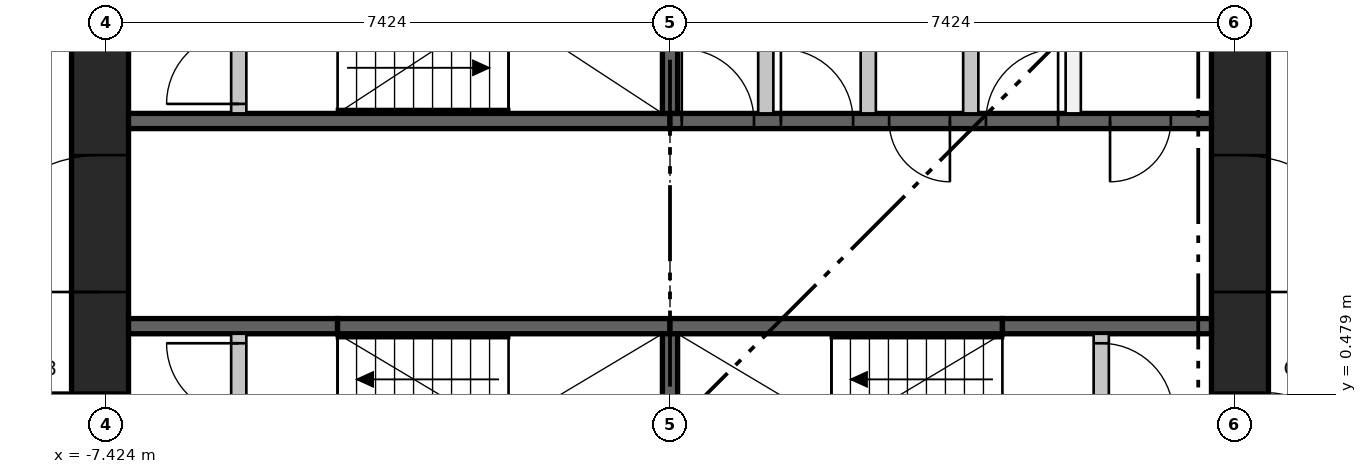
"""IFC4 building model, lengths in metres.
Left out: names, types, materials, properties, quantities, classifications, styles, units other than length and angle.
Written with IfcOpenShell. Run it as: python <this file> out.ifc"""

import sys

from ifc_helpers import new_model, si_unit, direction, frame, frame_2d, origin, place, context, subcontext, project, spatial, rectangle, extrude, element, fill, save


model = new_model("IFC4")
c1 = context("Model", 3, precision=1e-05, world=origin(), true_north=direction((0.0, 1.0)))
c2 = subcontext(c1, "Body", "Model", "MODEL_VIEW")
j1 = project(units=[si_unit("LENGTHUNIT", "METRE"), si_unit("PLANEANGLEUNIT", "RADIAN")], contexts=[c1])
p1 = place(None, origin())
s1 = spatial("IfcSite", under=j1, at=p1, CompositionType="ELEMENT")
p2 = place(p1, origin())
s2 = spatial("IfcBuilding", under=s1, at=p2, CompositionType="ELEMENT")
p3 = place(p2, frame((0.0, 0.0, 109.25)))
s3 = spatial("IfcBuildingStorey", under=s2, at=p3, CompositionType="ELEMENT", Elevation=109.25)
p4 = place(p3, frame((-7.499, -7.124, 0.0), z_axis=(0.0, 0.0, 1.0), x_axis=(0.0, 1.0, 0.0)))
e1 = element("IfcWall", 1, at=p4, inside=s3, PredefinedType="SHEAR", context=c2, shape_type="SweptSolid", body=[
    extrude(rectangle(XDim=14.248, YDim=0.75, at=frame_2d((7.124, 0.0))), origin(), (0.0, 0.0, 1.0), 3.65),
])
p5 = place(p4, frame((6.624, 0.0, 0.0)))
e2 = element("IfcOpeningElement", 2, at=p5, cuts=e1, PredefinedType="OPENING", context=c2, shape_type="SweptSolid", body=[
    extrude(rectangle(XDim=1.0, YDim=2.1, at=frame_2d((0.5, 1.05))), frame((0.0, 0.385, 0.0), z_axis=(0.0, -1.0, 0.0), x_axis=(1.0, 0.0, 0.0)), (0.0, 0.0, 1.0), 0.77),
])
p6 = place(p4, frame((3.5, 0.0, 0.0)))
e3 = element("IfcOpeningElement", 3, at=p6, cuts=e1, PredefinedType="OPENING", context=c2, shape_type="SweptSolid", body=[
    extrude(rectangle(XDim=1.8, YDim=2.1, at=frame_2d((0.9, 1.05))), frame((0.0, 0.385, 0.0), z_axis=(0.0, -1.0, 0.0), x_axis=(1.0, 0.0, 0.0)), (0.0, 0.0, 1.0), 0.77),
])
p7 = place(p4, frame((8.948, 0.0, 0.0)))
e4 = element("IfcOpeningElement", 4, at=p7, cuts=e1, PredefinedType="OPENING", context=c2, shape_type="SweptSolid", body=[
    extrude(rectangle(XDim=1.8, YDim=2.1, at=frame_2d((0.9, 1.05))), frame((0.0, 0.385, 0.0), z_axis=(0.0, -1.0, 0.0), x_axis=(1.0, 0.0, 0.0)), (0.0, 0.0, 1.0), 0.77),
])
p8 = place(p4, frame((12.124, 0.0, 0.0)))
e5 = element("IfcOpeningElement", 5, at=p8, cuts=e1, PredefinedType="OPENING", context=c2, shape_type="SweptSolid", body=[
    extrude(rectangle(XDim=1.0, YDim=2.1, at=frame_2d((0.5, 1.05))), frame((0.0, 0.385, 0.0), z_axis=(0.0, -1.0, 0.0), x_axis=(1.0, 0.0, 0.0)), (0.0, 0.0, 1.0), 0.77),
])
p9 = place(p3, frame((7.499, -7.124, 0.0), z_axis=(0.0, 0.0, 1.0), x_axis=(0.0, 1.0, 0.0)))
e6 = element("IfcWall", 6, at=p9, inside=s3, PredefinedType="SHEAR", context=c2, shape_type="SweptSolid", body=[
    extrude(rectangle(XDim=14.248, YDim=0.75, at=frame_2d((7.124, 0.0))), origin(), (0.0, 0.0, 1.0), 3.65),
])
p10 = place(p9, frame((6.624, 0.0, 0.0)))
e7 = element("IfcOpeningElement", 7, at=p10, cuts=e6, PredefinedType="OPENING", context=c2, shape_type="SweptSolid", body=[
    extrude(rectangle(XDim=1.0, YDim=2.1, at=frame_2d((0.5, 1.05))), frame((0.0, 0.385, 0.0), z_axis=(0.0, -1.0, 0.0), x_axis=(1.0, 0.0, 0.0)), (0.0, 0.0, 1.0), 0.77),
])
p11 = place(p9, frame((3.5, 0.0, 0.0)))
e8 = element("IfcOpeningElement", 8, at=p11, cuts=e6, PredefinedType="OPENING", context=c2, shape_type="SweptSolid", body=[
    extrude(rectangle(XDim=1.8, YDim=2.1, at=frame_2d((0.9, 1.05))), frame((0.0, 0.385, 0.0), z_axis=(0.0, -1.0, 0.0), x_axis=(1.0, 0.0, 0.0)), (0.0, 0.0, 1.0), 0.77),
])
p12 = place(p9, frame((8.948, 0.0, 0.0)))
e9 = element("IfcOpeningElement", 9, at=p12, cuts=e6, PredefinedType="OPENING", context=c2, shape_type="SweptSolid", body=[
    extrude(rectangle(XDim=1.8, YDim=2.1, at=frame_2d((0.9, 1.05))), frame((0.0, 0.385, 0.0), z_axis=(0.0, -1.0, 0.0), x_axis=(1.0, 0.0, 0.0)), (0.0, 0.0, 1.0), 0.77),
])
p13 = place(p3, frame((-7.124, 4.074, 0.0), z_axis=(0.0, 0.0, 1.0), x_axis=(1.0, 0.0, 0.0)))
e10 = element("IfcWall", 10, at=p13, inside=s3, PredefinedType="SHEAR", context=c2, shape_type="SweptSolid", body=[
    extrude(rectangle(XDim=7.124, YDim=0.2, at=frame_2d((3.562, 0.0))), origin(), (0.0, 0.0, 1.0), 3.3),
])
p14 = place(p3, frame((0.0, 4.074, 0.0), z_axis=(0.0, 0.0, 1.0), x_axis=(1.0, 0.0, 0.0)))
e11 = element("IfcWall", 11, at=p14, inside=s3, PredefinedType="SHEAR", context=c2, shape_type="SweptSolid", body=[
    extrude(rectangle(XDim=7.124, YDim=0.2, at=frame_2d((3.562, 0.0))), origin(), (0.0, 0.0, 1.0), 3.3),
])
p15 = place(p14, frame((0.155, 0.0, 0.0)))
e12 = element("IfcOpeningElement", 12, at=p15, cuts=e11, PredefinedType="OPENING", context=c2, shape_type="SweptSolid", body=[
    extrude(rectangle(XDim=0.95, YDim=2.1, at=frame_2d((0.475, 1.05))), frame((0.0, 0.11, 0.0), z_axis=(0.0, -1.0, 0.0), x_axis=(1.0, 0.0, 0.0)), (0.0, 0.0, 1.0), 0.22),
])
p16 = place(p14, frame((1.459, 0.0, 0.0)))
e13 = element("IfcOpeningElement", 13, at=p16, cuts=e11, PredefinedType="OPENING", context=c2, shape_type="SweptSolid", body=[
    extrude(rectangle(XDim=0.95, YDim=2.1, at=frame_2d((0.475, 1.05))), frame((0.0, 0.11, 0.0), z_axis=(0.0, -1.0, 0.0), x_axis=(1.0, 0.0, 0.0)), (0.0, 0.0, 1.0), 0.22),
])
p17 = place(p14, frame((2.883, 0.0, 0.0)))
e14 = element("IfcOpeningElement", 14, at=p17, cuts=e11, PredefinedType="OPENING", context=c2, shape_type="SweptSolid", body=[
    extrude(rectangle(XDim=0.8, YDim=2.1, at=frame_2d((0.4, 1.05))), frame((0.0, 0.11, 0.0), z_axis=(0.0, -1.0, 0.0), x_axis=(1.0, 0.0, 0.0)), (0.0, 0.0, 1.0), 0.22),
])
p18 = place(p14, frame((4.156, 0.0, 0.0)))
e15 = element("IfcOpeningElement", 15, at=p18, cuts=e11, PredefinedType="OPENING", context=c2, shape_type="SweptSolid", body=[
    extrude(rectangle(XDim=0.95, YDim=2.1, at=frame_2d((0.475, 1.05))), frame((0.0, 0.11, 0.0), z_axis=(0.0, -1.0, 0.0), x_axis=(1.0, 0.0, 0.0)), (0.0, 0.0, 1.0), 0.22),
])
p19 = place(p14, frame((5.79, 0.0, 0.0)))
e16 = element("IfcOpeningElement", 16, at=p19, cuts=e11, PredefinedType="OPENING", context=c2, shape_type="SweptSolid", body=[
    extrude(rectangle(XDim=0.8, YDim=2.1, at=frame_2d((0.4, 1.05))), frame((0.0, 0.11, 0.0), z_axis=(0.0, -1.0, 0.0), x_axis=(1.0, 0.0, 0.0)), (0.0, 0.0, 1.0), 0.22),
])
p20 = place(p3, frame((-7.124, 1.375, 0.0), z_axis=(0.0, 0.0, 1.0), x_axis=(1.0, 0.0, 0.0)))
e17 = element("IfcWall", 17, at=p20, inside=s3, PredefinedType="SHEAR", context=c2, shape_type="SweptSolid", body=[
    extrude(rectangle(XDim=2.75, YDim=0.2, at=frame_2d((1.375, 0.0))), origin(), (0.0, 0.0, 1.0), 3.3),
])
for number, where, z_axis, x_axis in (
    (18, (-4.374, 1.375, 0.0), (0.0, 0.0, 1.0), (1.0, 0.0, 0.0)),
    (19, (0.0, 1.375, 0.0), (0.0, 0.0, 1.0), (1.0, 0.0, 0.0)),
):
    element("IfcWall", number, at=place(p3, frame(where, z_axis=z_axis, x_axis=x_axis)), inside=s3, PredefinedType="SHEAR", context=c2, shape_type="SweptSolid", body=[
        extrude(rectangle(XDim=4.374, YDim=0.2, at=frame_2d((2.187, 0.0))), origin(), (0.0, 0.0, 1.0), 3.3),
    ])
p21 = place(p3, frame((4.374, 1.375, 0.0), z_axis=(0.0, 0.0, 1.0), x_axis=(1.0, 0.0, 0.0)))
e20 = element("IfcWall", 20, at=p21, inside=s3, PredefinedType="SHEAR", context=c2, shape_type="SweptSolid", body=[
    extrude(rectangle(XDim=2.75, YDim=0.2, at=frame_2d((1.375, 0.0))), origin(), (0.0, 0.0, 1.0), 3.3),
])
p22 = place(p3, frame((0.0, -1.275, 0.0), z_axis=(0.0, 0.0, 1.0), x_axis=(0.0, 1.0, 0.0)))
e21 = element("IfcWall", 21, at=p22, inside=s3, PredefinedType="SHEAR", context=c2, shape_type="SweptSolid", body=[
    extrude(rectangle(XDim=2.55, YDim=0.2, at=frame_2d((1.275, 0.0))), origin(), (0.0, 0.0, 1.0), 3.3),
])
p23 = place(p3, frame((0.0, 4.174, 0.0), z_axis=(0.0, 0.0, 1.0), x_axis=(0.0, 1.0, 0.0)))
e22 = element("IfcWall", 22, at=p23, inside=s3, PredefinedType="SHEAR", context=c2, shape_type="SweptSolid", body=[
    extrude(rectangle(XDim=1.4, YDim=0.2, at=frame_2d((0.7, 0.0))), origin(), (0.0, 0.0, 1.0), 3.3),
])
for number, where, z_axis, x_axis in (
    (23, (1.26, 4.174, 0.0), (0.0, 0.0, 1.0), (0.0, 1.0, 0.0)),
    (24, (2.609, 4.174, 0.0), (0.0, 0.0, 1.0), (0.0, 1.0, 0.0)),
    (25, (3.957, 4.174, 0.0), (0.0, 0.0, 1.0), (0.0, 1.0, 0.0)),
    (26, (5.305, 4.174, 0.0), (0.0, 0.0, 1.0), (0.0, 1.0, 0.0)),
):
    element("IfcWall", number, at=place(p3, frame(where, z_axis=z_axis, x_axis=x_axis)), inside=s3, PredefinedType="PARTITIONING", context=c2, shape_type="SweptSolid", body=[
        extrude(rectangle(XDim=2.95, YDim=0.2, at=frame_2d((1.475, 0.0))), origin(), (0.0, 0.0, 1.0), 3.3),
    ])
p24 = place(p3, frame((-5.674, -1.275, 0.0), z_axis=(0.0, 0.0, 1.0), x_axis=(0.0, 1.0, 0.0)))
e27 = element("IfcWall", 27, at=p24, inside=s3, PredefinedType="PARTITIONING", context=c2, shape_type="SweptSolid", body=[
    extrude(rectangle(XDim=2.55, YDim=0.2, at=frame_2d((1.275, 0.0))), origin(), (0.0, 0.0, 1.0), 3.3),
])
p25 = place(p24, frame((0.125, 0.0, 0.0)))
e28 = element("IfcOpeningElement", 28, at=p25, cuts=e27, PredefinedType="OPENING", context=c2, shape_type="SweptSolid", body=[
    extrude(rectangle(XDim=0.95, YDim=2.1, at=frame_2d((0.475, 1.05))), frame((0.0, 0.11, 0.0), z_axis=(0.0, -1.0, 0.0), x_axis=(1.0, 0.0, 0.0)), (0.0, 0.0, 1.0), 0.22),
])
p26 = place(p24, frame((1.475, 0.0, 0.0)))
e29 = element("IfcOpeningElement", 29, at=p26, cuts=e27, PredefinedType="OPENING", context=c2, shape_type="SweptSolid", body=[
    extrude(rectangle(XDim=0.95, YDim=2.1, at=frame_2d((0.475, 1.05))), frame((0.0, 0.11, 0.0), z_axis=(0.0, -1.0, 0.0), x_axis=(1.0, 0.0, 0.0)), (0.0, 0.0, 1.0), 0.22),
])
p27 = place(p3, frame((5.674, -1.275, 0.0), z_axis=(0.0, 0.0, 1.0), x_axis=(0.0, 1.0, 0.0)))
e30 = element("IfcWall", 30, at=p27, inside=s3, PredefinedType="PARTITIONING", context=c2, shape_type="SweptSolid", body=[
    extrude(rectangle(XDim=2.55, YDim=0.2, at=frame_2d((1.275, 0.0))), origin(), (0.0, 0.0, 1.0), 3.3),
])
p28 = place(p27, frame((0.125, 0.0, 0.0)))
e31 = element("IfcOpeningElement", 31, at=p28, cuts=e30, PredefinedType="OPENING", context=c2, shape_type="SweptSolid", body=[
    extrude(rectangle(XDim=0.95, YDim=2.1, at=frame_2d((0.475, 1.05))), frame((0.0, 0.11, 0.0), z_axis=(0.0, -1.0, 0.0), x_axis=(1.0, 0.0, 0.0)), (0.0, 0.0, 1.0), 0.22),
])
p29 = place(p27, frame((1.475, 0.0, 0.0)))
e32 = element("IfcOpeningElement", 32, at=p29, cuts=e30, PredefinedType="OPENING", context=c2, shape_type="SweptSolid", body=[
    extrude(rectangle(XDim=0.95, YDim=2.1, at=frame_2d((0.475, 1.05))), frame((0.0, 0.11, 0.0), z_axis=(0.0, -1.0, 0.0), x_axis=(1.0, 0.0, 0.0)), (0.0, 0.0, 1.0), 0.22),
])
p30 = place(p3, frame((-5.674, 4.174, 0.0), z_axis=(0.0, 0.0, 1.0), x_axis=(0.0, 1.0, 0.0)))
e33 = element("IfcWall", 33, at=p30, inside=s3, PredefinedType="PARTITIONING", context=c2, shape_type="SweptSolid", body=[
    extrude(rectangle(XDim=2.95, YDim=0.2, at=frame_2d((1.475, 0.0))), origin(), (0.0, 0.0, 1.0), 3.3),
])
p31 = place(p30, frame((0.125, 0.0, 0.0)))
e34 = element("IfcOpeningElement", 34, at=p31, cuts=e33, PredefinedType="OPENING", context=c2, shape_type="SweptSolid", body=[
    extrude(rectangle(XDim=0.95, YDim=2.1, at=frame_2d((0.475, 1.05))), frame((0.0, 0.11, 0.0), z_axis=(0.0, -1.0, 0.0), x_axis=(1.0, 0.0, 0.0)), (0.0, 0.0, 1.0), 0.22),
])
p32 = place(p30, frame((1.725, 0.0, 0.0)))
e35 = element("IfcOpeningElement", 35, at=p32, cuts=e33, PredefinedType="OPENING", context=c2, shape_type="SweptSolid", body=[
    extrude(rectangle(XDim=0.95, YDim=2.1, at=frame_2d((0.475, 1.05))), frame((0.0, 0.11, 0.0), z_axis=(0.0, -1.0, 0.0), x_axis=(1.0, 0.0, 0.0)), (0.0, 0.0, 1.0), 0.22),
])
p33 = place(p26, origin())
e36 = element("IfcDoor", 36, at=p33, inside=s3, OperationType="SINGLE_SWING_RIGHT", PredefinedType="DOOR", context=c2, shape_type="SweptSolid", body=[
    extrude(rectangle(XDim=0.95, YDim=2.1, at=frame_2d((0.475, 1.05))), frame((0.0, 0.025, 0.0), z_axis=(0.0, -1.0, 0.0), x_axis=(1.0, 0.0, 0.0)), (0.0, 0.0, 1.0), 0.05),
])
fill(e29, e36)
p34 = place(p29, frame((0.95, 0.0, 0.0), z_axis=(0.0, 0.0, 1.0), x_axis=(-1.0, 0.0, 0.0)))
e37 = element("IfcDoor", 37, at=p34, inside=s3, OperationType="SINGLE_SWING_LEFT", PredefinedType="DOOR", context=c2, shape_type="SweptSolid", body=[
    extrude(rectangle(XDim=0.95, YDim=2.1, at=frame_2d((0.475, 1.05))), frame((0.0, 0.025, 0.0), z_axis=(0.0, -1.0, 0.0), x_axis=(1.0, 0.0, 0.0)), (0.0, 0.0, 1.0), 0.05),
])
fill(e32, e37)
p35 = place(p31, origin())
e38 = element("IfcDoor", 38, at=p35, inside=s3, OperationType="SINGLE_SWING_LEFT", PredefinedType="DOOR", context=c2, shape_type="SweptSolid", body=[
    extrude(rectangle(XDim=0.95, YDim=2.1, at=frame_2d((0.475, 1.05))), frame((0.0, 0.025, 0.0), z_axis=(0.0, -1.0, 0.0), x_axis=(1.0, 0.0, 0.0)), (0.0, 0.0, 1.0), 0.05),
])
fill(e34, e38)
p36 = place(p15, origin())
e39 = element("IfcDoor", 39, at=p36, inside=s3, OperationType="SINGLE_SWING_LEFT", PredefinedType="DOOR", context=c2, shape_type="SweptSolid", body=[
    extrude(rectangle(XDim=0.95, YDim=2.1, at=frame_2d((0.475, 1.05))), frame((0.0, 0.025, 0.0), z_axis=(0.0, -1.0, 0.0), x_axis=(1.0, 0.0, 0.0)), (0.0, 0.0, 1.0), 0.05),
])
fill(e12, e39)
p37 = place(p16, origin())
e40 = element("IfcDoor", 40, at=p37, inside=s3, OperationType="SINGLE_SWING_LEFT", PredefinedType="DOOR", context=c2, shape_type="SweptSolid", body=[
    extrude(rectangle(XDim=0.95, YDim=2.1, at=frame_2d((0.475, 1.05))), frame((0.0, 0.025, 0.0), z_axis=(0.0, -1.0, 0.0), x_axis=(1.0, 0.0, 0.0)), (0.0, 0.0, 1.0), 0.05),
])
fill(e13, e40)
p38 = place(p17, frame((0.8, 0.0, 0.0), z_axis=(0.0, 0.0, 1.0), x_axis=(-1.0, 0.0, 0.0)))
e41 = element("IfcDoor", 41, at=p38, inside=s3, OperationType="SINGLE_SWING_RIGHT", PredefinedType="DOOR", context=c2, shape_type="SweptSolid", body=[
    extrude(rectangle(XDim=0.8, YDim=2.1, at=frame_2d((0.4, 1.05))), frame((0.0, 0.025, 0.0), z_axis=(0.0, -1.0, 0.0), x_axis=(1.0, 0.0, 0.0)), (0.0, 0.0, 1.0), 0.05),
])
fill(e14, e41)
p39 = place(p18, origin())
e42 = element("IfcDoor", 42, at=p39, inside=s3, OperationType="SINGLE_SWING_RIGHT", PredefinedType="DOOR", context=c2, shape_type="SweptSolid", body=[
    extrude(rectangle(XDim=0.95, YDim=2.1, at=frame_2d((0.475, 1.05))), frame((0.0, 0.025, 0.0), z_axis=(0.0, -1.0, 0.0), x_axis=(1.0, 0.0, 0.0)), (0.0, 0.0, 1.0), 0.05),
])
fill(e15, e42)
p40 = place(p19, frame((0.8, 0.0, 0.0), z_axis=(0.0, 0.0, 1.0), x_axis=(-1.0, 0.0, 0.0)))
e43 = element("IfcDoor", 43, at=p40, inside=s3, OperationType="SINGLE_SWING_LEFT", PredefinedType="DOOR", context=c2, shape_type="SweptSolid", body=[
    extrude(rectangle(XDim=0.8, YDim=2.1, at=frame_2d((0.4, 1.05))), frame((0.0, 0.025, 0.0), z_axis=(0.0, -1.0, 0.0), x_axis=(1.0, 0.0, 0.0)), (0.0, 0.0, 1.0), 0.05),
])
fill(e16, e43)
p41 = place(p5, origin())
e44 = element("IfcDoor", 44, at=p41, inside=s3, OperationType="SINGLE_SWING_RIGHT", PredefinedType="DOOR", context=c2, shape_type="SweptSolid", body=[
    extrude(rectangle(XDim=1.0, YDim=2.1, at=frame_2d((0.5, 1.05))), frame((0.0, 0.375, 0.0), z_axis=(0.0, -1.0, 0.0), x_axis=(1.0, 0.0, 0.0)), (0.0, 0.0, 1.0), 0.05),
])
fill(e2, e44)
p42 = place(p7, origin())
e45 = element("IfcDoor", 45, at=p42, inside=s3, OperationType="DOUBLE_DOOR_SINGLE_SWING", PredefinedType="DOOR", context=c2, shape_type="SweptSolid", body=[
    extrude(rectangle(XDim=1.8, YDim=2.1, at=frame_2d((0.9, 1.05))), frame((0.0, 0.025, 0.0), z_axis=(0.0, -1.0, 0.0), x_axis=(1.0, 0.0, 0.0)), (0.0, 0.0, 1.0), 0.05),
])
fill(e4, e45)
p43 = place(p10, frame((1.0, 0.0, 0.0), z_axis=(0.0, 0.0, 1.0), x_axis=(-1.0, 0.0, 0.0)))
e46 = element("IfcDoor", 46, at=p43, inside=s3, OperationType="SINGLE_SWING_LEFT", PredefinedType="DOOR", context=c2, shape_type="SweptSolid", body=[
    extrude(rectangle(XDim=1.0, YDim=2.1, at=frame_2d((0.5, 1.05))), frame((0.0, 0.375, 0.0), z_axis=(0.0, -1.0, 0.0), x_axis=(1.0, 0.0, 0.0)), (0.0, 0.0, 1.0), 0.05),
])
fill(e7, e46)
p44 = place(p12, frame((1.8, 0.0, 0.0), z_axis=(0.0, 0.0, 1.0), x_axis=(-1.0, 0.0, 0.0)))
e47 = element("IfcDoor", 47, at=p44, inside=s3, OperationType="DOUBLE_DOOR_SINGLE_SWING", PredefinedType="DOOR", context=c2, shape_type="SweptSolid", body=[
    extrude(rectangle(XDim=1.8, YDim=2.1, at=frame_2d((0.9, 1.05))), frame((0.0, 0.025, 0.0), z_axis=(0.0, -1.0, 0.0), x_axis=(1.0, 0.0, 0.0)), (0.0, 0.0, 1.0), 0.05),
])
fill(e9, e47)
save(model, sys.argv[1])
